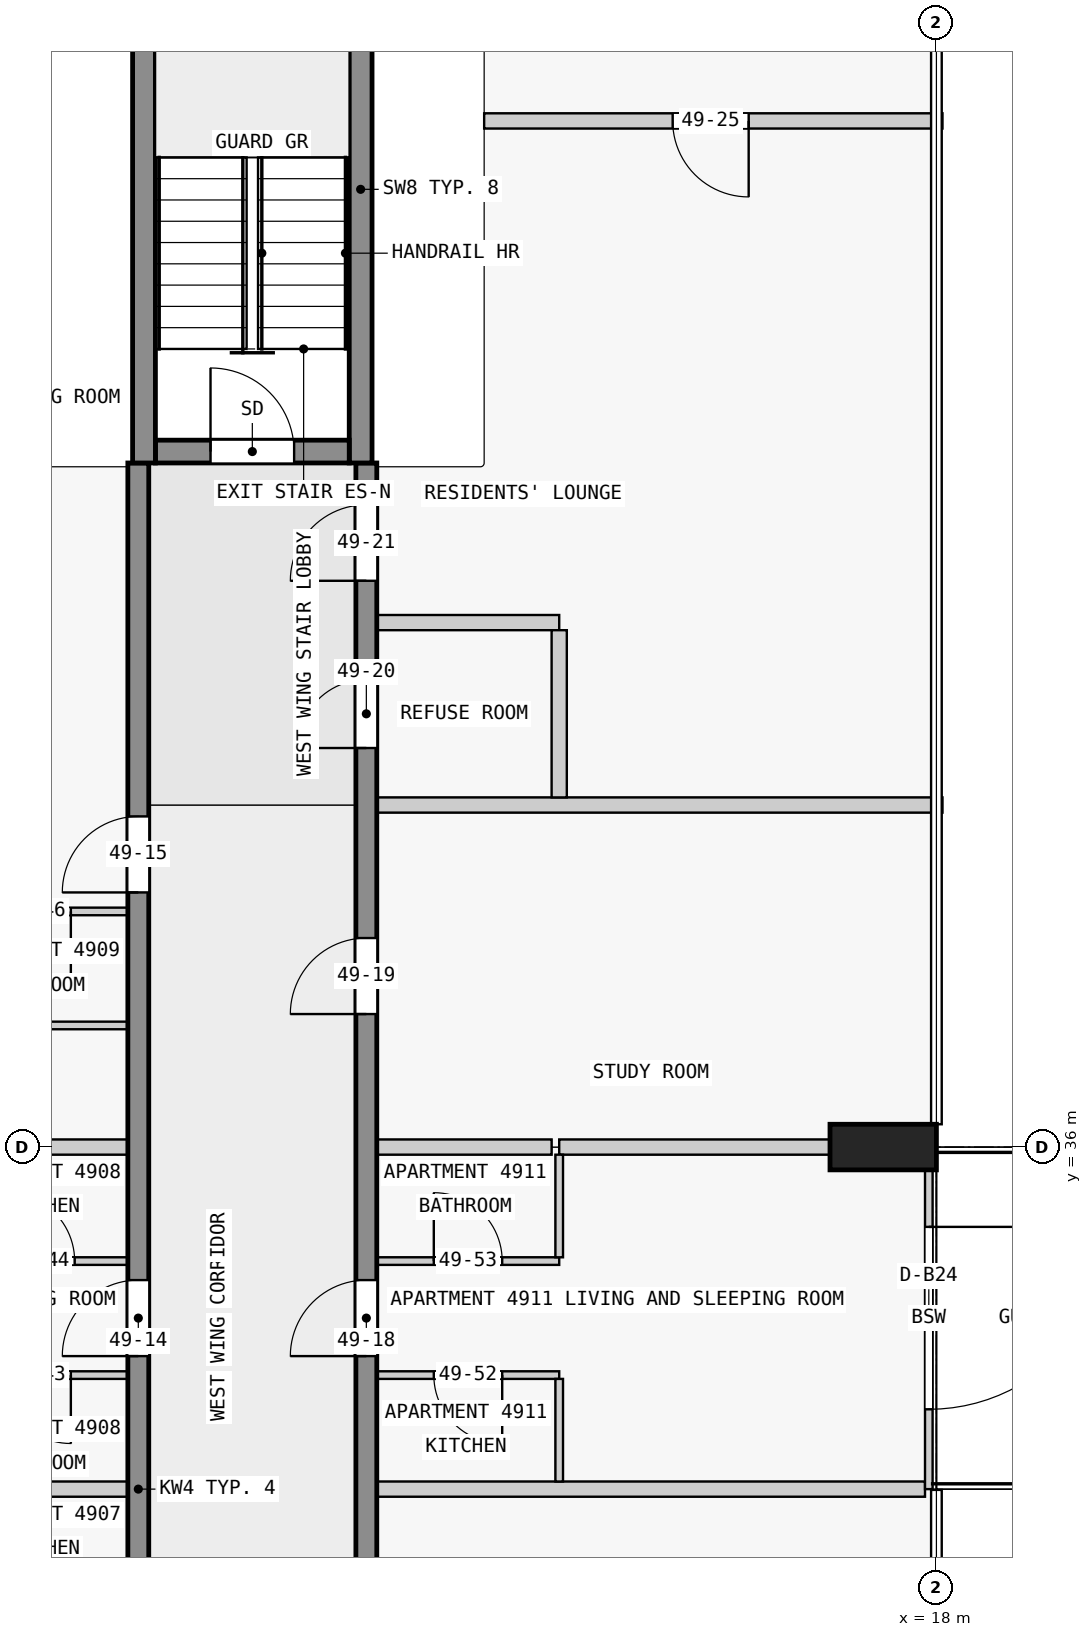
"""IFC4 building model, lengths in metres.
Left out: names, types, materials, properties, quantities, classifications, styles, units other than length and angle.
Written with IfcOpenShell. Run it as: python <this file> out.ifc"""

import sys

from ifc_helpers import new_model, si_unit, direction, frame, frame_2d, origin, origin_2d, place, context, subcontext, project, spatial, rectangle, extrude, element, fill, save


model = new_model("IFC4")
c1 = context("Model", 3, precision=1e-05, world=origin(), true_north=direction((0.0, 1.0)))
c2 = subcontext(c1, "Body", "Model", "MODEL_VIEW")
j1 = project(units=[si_unit("LENGTHUNIT", "METRE"), si_unit("PLANEANGLEUNIT", "RADIAN")], contexts=[c1])
p1 = place(None, origin())
s1 = spatial("IfcSite", under=j1, at=p1, CompositionType="ELEMENT")
p2 = place(p1, origin())
s2 = spatial("IfcBuilding", under=s1, at=p2, CompositionType="ELEMENT")
p3 = place(p2, frame((0.0, 0.0, 190.9)))
s3 = spatial("IfcBuildingStorey", under=s2, at=p3, CompositionType="ELEMENT", Elevation=190.9)
p4 = place(p3, frame((17.3, 36.0, 0.0), z_axis=(0.0, 0.0, 1.0), x_axis=(0.0, 1.0, 0.0)))
e1 = element("IfcColumn", 1, at=p4, inside=s3, PredefinedType="COLUMN", context=c2, shape_type="SweptSolid", body=[
    extrude(rectangle(XDim=0.6, YDim=1.4, at=origin_2d()), origin(), (0.0, 0.0, 1.0), 3.5),
])
p5 = place(p3, frame((7.725, 45.15, 0.0), z_axis=(0.0, 0.0, 1.0), x_axis=(1.0, 0.0, 0.0)))
e2 = element("IfcWall", 2, at=p5, inside=s3, PredefinedType="SHEAR", context=c2, shape_type="SweptSolid", body=[
    extrude(rectangle(XDim=2.55, YDim=0.3, at=frame_2d((1.275, 0.0))), origin(), (0.0, 0.0, 1.0), 3.5),
])
p6 = place(p5, frame((0.725, 0.0, 0.0)))
e3 = element("IfcOpeningElement", 3, at=p6, cuts=e2, PredefinedType="OPENING", context=c2, shape_type="SweptSolid", body=[
    extrude(rectangle(XDim=1.1, YDim=2.1, at=frame_2d((0.55, 1.05))), frame((0.0, 0.16, 0.0), z_axis=(0.0, -1.0, 0.0), x_axis=(1.0, 0.0, 0.0)), (0.0, 0.0, 1.0), 0.32),
])
for number, where, z_axis, x_axis in (
    (4, (7.575, 45.0, 0.0), (0.0, 0.0, 1.0), (0.0, 1.0, 0.0)),
    (5, (10.425, 45.0, 0.0), (0.0, 0.0, 1.0), (0.0, 1.0, 0.0)),
):
    element("IfcWall", number, at=place(p3, frame(where, z_axis=z_axis, x_axis=x_axis)), inside=s3, PredefinedType="SHEAR", context=c2, shape_type="SweptSolid", body=[
        extrude(rectangle(XDim=7.2, YDim=0.3, at=frame_2d((3.6, 0.0))), origin(), (0.0, 0.0, 1.0), 3.5),
    ])
p7 = place(p3, frame((7.5, 18.0, 0.0), z_axis=(0.0, 0.0, 1.0), x_axis=(0.0, 1.0, 0.0)))
e6 = element("IfcWall", 6, at=p7, inside=s3, PredefinedType="SHEAR", context=c2, shape_type="SweptSolid", body=[
    extrude(rectangle(XDim=27.0, YDim=0.275, at=frame_2d((13.5, 0.0))), origin(), (0.0, 0.0, 1.0), 3.25),
])
p8 = place(p7, frame((1.75, 0.0, 0.0)))
e7 = element("IfcOpeningElement", 7, at=p8, cuts=e6, PredefinedType="OPENING", context=c2, shape_type="SweptSolid", body=[
    extrude(rectangle(XDim=1.0, YDim=2.1, at=frame_2d((0.5, 1.05))), frame((0.0, 0.147, 0.0), z_axis=(0.0, -1.0, 0.0), x_axis=(1.0, 0.0, 0.0)), (0.0, 0.0, 1.0), 0.295),
])
p9 = place(p7, frame((5.85, 0.0, 0.0)))
e8 = element("IfcOpeningElement", 8, at=p9, cuts=e6, PredefinedType="OPENING", context=c2, shape_type="SweptSolid", body=[
    extrude(rectangle(XDim=1.8, YDim=2.1, at=frame_2d((0.9, 1.05))), frame((0.0, 0.147, 0.0), z_axis=(0.0, -1.0, 0.0), x_axis=(1.0, 0.0, 0.0)), (0.0, 0.0, 1.0), 0.295),
])
p10 = place(p7, frame((10.75, 0.0, 0.0)))
e9 = element("IfcOpeningElement", 9, at=p10, cuts=e6, PredefinedType="OPENING", context=c2, shape_type="SweptSolid", body=[
    extrude(rectangle(XDim=1.0, YDim=2.1, at=frame_2d((0.5, 1.05))), frame((0.0, 0.147, 0.0), z_axis=(0.0, -1.0, 0.0), x_axis=(1.0, 0.0, 0.0)), (0.0, 0.0, 1.0), 0.295),
])
p11 = place(p7, frame((15.25, 0.0, 0.0)))
e10 = element("IfcOpeningElement", 10, at=p11, cuts=e6, PredefinedType="OPENING", context=c2, shape_type="SweptSolid", body=[
    extrude(rectangle(XDim=1.0, YDim=2.1, at=frame_2d((0.5, 1.05))), frame((0.0, 0.147, 0.0), z_axis=(0.0, -1.0, 0.0), x_axis=(1.0, 0.0, 0.0)), (0.0, 0.0, 1.0), 0.295),
])
p12 = place(p7, frame((21.35, 0.0, 0.0)))
e11 = element("IfcOpeningElement", 11, at=p12, cuts=e6, PredefinedType="OPENING", context=c2, shape_type="SweptSolid", body=[
    extrude(rectangle(XDim=1.0, YDim=2.1, at=frame_2d((0.5, 1.05))), frame((0.0, 0.147, 0.0), z_axis=(0.0, -1.0, 0.0), x_axis=(1.0, 0.0, 0.0)), (0.0, 0.0, 1.0), 0.295),
])
p13 = place(p3, frame((10.5, 18.0, 0.0), z_axis=(0.0, 0.0, 1.0), x_axis=(0.0, 1.0, 0.0)))
e12 = element("IfcWall", 12, at=p13, inside=s3, PredefinedType="SHEAR", context=c2, shape_type="SweptSolid", body=[
    extrude(rectangle(XDim=27.0, YDim=0.275, at=frame_2d((13.5, 0.0))), origin(), (0.0, 0.0, 1.0), 3.25),
])
p14 = place(p13, frame((1.75, 0.0, 0.0)))
e13 = element("IfcOpeningElement", 13, at=p14, cuts=e12, PredefinedType="OPENING", context=c2, shape_type="SweptSolid", body=[
    extrude(rectangle(XDim=1.0, YDim=2.1, at=frame_2d((0.5, 1.05))), frame((0.0, 0.147, 0.0), z_axis=(0.0, -1.0, 0.0), x_axis=(1.0, 0.0, 0.0)), (0.0, 0.0, 1.0), 0.295),
])
p15 = place(p13, frame((6.25, 0.0, 0.0)))
e14 = element("IfcOpeningElement", 14, at=p15, cuts=e12, PredefinedType="OPENING", context=c2, shape_type="SweptSolid", body=[
    extrude(rectangle(XDim=1.0, YDim=2.1, at=frame_2d((0.5, 1.05))), frame((0.0, 0.147, 0.0), z_axis=(0.0, -1.0, 0.0), x_axis=(1.0, 0.0, 0.0)), (0.0, 0.0, 1.0), 0.295),
])
p16 = place(p13, frame((15.25, 0.0, 0.0)))
e15 = element("IfcOpeningElement", 15, at=p16, cuts=e12, PredefinedType="OPENING", context=c2, shape_type="SweptSolid", body=[
    extrude(rectangle(XDim=1.0, YDim=2.1, at=frame_2d((0.5, 1.05))), frame((0.0, 0.147, 0.0), z_axis=(0.0, -1.0, 0.0), x_axis=(1.0, 0.0, 0.0)), (0.0, 0.0, 1.0), 0.295),
])
p17 = place(p13, frame((19.75, 0.0, 0.0)))
e16 = element("IfcOpeningElement", 16, at=p17, cuts=e12, PredefinedType="OPENING", context=c2, shape_type="SweptSolid", body=[
    extrude(rectangle(XDim=1.0, YDim=2.1, at=frame_2d((0.5, 1.05))), frame((0.0, 0.147, 0.0), z_axis=(0.0, -1.0, 0.0), x_axis=(1.0, 0.0, 0.0)), (0.0, 0.0, 1.0), 0.295),
])
p18 = place(p13, frame((23.25, 0.0, 0.0)))
e17 = element("IfcOpeningElement", 17, at=p18, cuts=e12, PredefinedType="OPENING", context=c2, shape_type="SweptSolid", body=[
    extrude(rectangle(XDim=0.9, YDim=2.1, at=frame_2d((0.45, 1.05))), frame((0.0, 0.147, 0.0), z_axis=(0.0, -1.0, 0.0), x_axis=(1.0, 0.0, 0.0)), (0.0, 0.0, 1.0), 0.295),
])
p19 = place(p13, frame((25.45, 0.0, 0.0)))
e18 = element("IfcOpeningElement", 18, at=p19, cuts=e12, PredefinedType="OPENING", context=c2, shape_type="SweptSolid", body=[
    extrude(rectangle(XDim=1.0, YDim=2.1, at=frame_2d((0.5, 1.05))), frame((0.0, 0.147, 0.0), z_axis=(0.0, -1.0, 0.0), x_axis=(1.0, 0.0, 0.0)), (0.0, 0.0, 1.0), 0.295),
])
p20 = place(p3, frame((17.9, 36.0, 0.0), z_axis=(0.0, 0.0, 1.0), x_axis=(0.0, -1.0, 0.0)))
e19 = element("IfcWall", 19, at=p20, inside=s3, PredefinedType="STANDARD", context=c2, shape_type="SweptSolid", body=[
    extrude(rectangle(XDim=4.5, YDim=0.1, at=frame_2d((2.25, 0.0))), origin(), (0.0, 0.0, 1.0), 3.25),
])
p21 = place(p20, frame((1.05, 0.0, 0.0)))
e20 = element("IfcOpeningElement", 20, at=p21, cuts=e19, PredefinedType="OPENING", context=c2, shape_type="SweptSolid", body=[
    extrude(rectangle(XDim=2.4, YDim=2.4, at=frame_2d((1.2, 1.2))), frame((0.0, 0.06, 0.0), z_axis=(0.0, -1.0, 0.0), x_axis=(1.0, 0.0, 0.0)), (0.0, 0.0, 1.0), 0.12),
])
p22 = place(p3, frame((7.363, 31.5, 0.0), z_axis=(0.0, 0.0, 1.0), x_axis=(-1.0, 0.0, 0.0)))
e21 = element("IfcWall", 21, at=p22, inside=s3, PredefinedType="PARTITIONING", context=c2, shape_type="SweptSolid", body=[
    extrude(rectangle(XDim=2.3, YDim=0.2, at=frame_2d((1.15, 0.0))), origin(), (0.0, 0.0, 1.0), 3.25),
])
p23 = place(p3, frame((17.85, 31.5, 0.0), z_axis=(0.0, 0.0, 1.0), x_axis=(-1.0, 0.0, 0.0)))
e22 = element("IfcWall", 22, at=p23, inside=s3, PredefinedType="PARTITIONING", context=c2, shape_type="SweptSolid", body=[
    extrude(rectangle(XDim=7.213, YDim=0.2, at=frame_2d((3.606, 0.0))), origin(), (0.0, 0.0, 1.0), 3.25),
])
p24 = place(p3, frame((7.363, 33.0, 0.0), z_axis=(0.0, 0.0, 1.0), x_axis=(-1.0, 0.0, 0.0)))
e23 = element("IfcWall", 23, at=p24, inside=s3, PredefinedType="PARTITIONING", context=c2, shape_type="SweptSolid", body=[
    extrude(rectangle(XDim=2.35, YDim=0.1, at=frame_2d((1.175, 0.0))), origin(), (0.0, 0.0, 1.0), 3.25),
])
p25 = place(p24, frame((0.75, 0.0, 0.0)))
e24 = element("IfcOpeningElement", 24, at=p25, cuts=e23, PredefinedType="OPENING", context=c2, shape_type="SweptSolid", body=[
    extrude(rectangle(XDim=0.9, YDim=2.1, at=frame_2d((0.45, 1.05))), frame((0.0, 0.06, 0.0), z_axis=(0.0, -1.0, 0.0), x_axis=(1.0, 0.0, 0.0)), (0.0, 0.0, 1.0), 0.12),
])
p26 = place(p3, frame((13.038, 33.0, 0.0), z_axis=(0.0, 0.0, 1.0), x_axis=(-1.0, 0.0, 0.0)))
e25 = element("IfcWall", 25, at=p26, inside=s3, PredefinedType="PARTITIONING", context=c2, shape_type="SweptSolid", body=[
    extrude(rectangle(XDim=2.4, YDim=0.1, at=frame_2d((1.2, 0.0))), origin(), (0.0, 0.0, 1.0), 3.25),
])
p27 = place(p26, frame((0.75, 0.0, 0.0)))
e26 = element("IfcOpeningElement", 26, at=p27, cuts=e25, PredefinedType="OPENING", context=c2, shape_type="SweptSolid", body=[
    extrude(rectangle(XDim=0.9, YDim=2.1, at=frame_2d((0.45, 1.05))), frame((0.0, 0.06, 0.0), z_axis=(0.0, -1.0, 0.0), x_axis=(1.0, 0.0, 0.0)), (0.0, 0.0, 1.0), 0.12),
])
p28 = place(p3, frame((5.012, 34.5, 0.0), z_axis=(0.0, 0.0, 1.0), x_axis=(1.0, 0.0, 0.0)))
e27 = element("IfcWall", 27, at=p28, inside=s3, PredefinedType="PARTITIONING", context=c2, shape_type="SweptSolid", body=[
    extrude(rectangle(XDim=2.35, YDim=0.1, at=frame_2d((1.175, 0.0))), origin(), (0.0, 0.0, 1.0), 3.25),
])
p29 = place(p28, frame((0.75, 0.0, 0.0)))
e28 = element("IfcOpeningElement", 28, at=p29, cuts=e27, PredefinedType="OPENING", context=c2, shape_type="SweptSolid", body=[
    extrude(rectangle(XDim=0.9, YDim=2.1, at=frame_2d((0.45, 1.05))), frame((0.0, 0.06, 0.0), z_axis=(0.0, -1.0, 0.0), x_axis=(1.0, 0.0, 0.0)), (0.0, 0.0, 1.0), 0.12),
])
p30 = place(p3, frame((10.637, 34.5, 0.0), z_axis=(0.0, 0.0, 1.0), x_axis=(1.0, 0.0, 0.0)))
e29 = element("IfcWall", 29, at=p30, inside=s3, PredefinedType="PARTITIONING", context=c2, shape_type="SweptSolid", body=[
    extrude(rectangle(XDim=2.4, YDim=0.1, at=frame_2d((1.2, 0.0))), origin(), (0.0, 0.0, 1.0), 3.25),
])
p31 = place(p30, frame((0.75, 0.0, 0.0)))
e30 = element("IfcOpeningElement", 30, at=p31, cuts=e29, PredefinedType="OPENING", context=c2, shape_type="SweptSolid", body=[
    extrude(rectangle(XDim=0.9, YDim=2.1, at=frame_2d((0.45, 1.05))), frame((0.0, 0.06, 0.0), z_axis=(0.0, -1.0, 0.0), x_axis=(1.0, 0.0, 0.0)), (0.0, 0.0, 1.0), 0.12),
])
for number, where, z_axis, x_axis in (
    (31, (7.363, 36.0, 0.0), (0.0, 0.0, 1.0), (-1.0, 0.0, 0.0)),
    (32, (12.938, 36.0, 0.0), (0.0, 0.0, 1.0), (-1.0, 0.0, 0.0)),
):
    element("IfcWall", number, at=place(p3, frame(where, z_axis=z_axis, x_axis=x_axis)), inside=s3, PredefinedType="PARTITIONING", context=c2, shape_type="SweptSolid", body=[
        extrude(rectangle(XDim=2.3, YDim=0.2, at=frame_2d((1.15, 0.0))), origin(), (0.0, 0.0, 1.0), 3.25),
    ])
p32 = place(p3, frame((13.038, 36.0, 0.0), z_axis=(0.0, 0.0, 1.0), x_axis=(1.0, 0.0, 0.0)))
e33 = element("IfcWall", 33, at=p32, inside=s3, PredefinedType="PARTITIONING", context=c2, shape_type="SweptSolid", body=[
    extrude(rectangle(XDim=3.562, YDim=0.2, at=frame_2d((1.781, 0.0))), origin(), (0.0, 0.0, 1.0), 3.25),
])
p33 = place(p3, frame((7.363, 37.6, 0.0), z_axis=(0.0, 0.0, 1.0), x_axis=(-1.0, 0.0, 0.0)))
e34 = element("IfcWall", 34, at=p33, inside=s3, PredefinedType="PARTITIONING", context=c2, shape_type="SweptSolid", body=[
    extrude(rectangle(XDim=2.35, YDim=0.1, at=frame_2d((1.175, 0.0))), origin(), (0.0, 0.0, 1.0), 3.25),
])
p34 = place(p3, frame((7.363, 39.1, 0.0), z_axis=(0.0, 0.0, 1.0), x_axis=(-1.0, 0.0, 0.0)))
e35 = element("IfcWall", 35, at=p34, inside=s3, PredefinedType="PARTITIONING", context=c2, shape_type="SweptSolid", body=[
    extrude(rectangle(XDim=2.35, YDim=0.1, at=frame_2d((1.175, 0.0))), origin(), (0.0, 0.0, 1.0), 3.25),
])
p35 = place(p34, frame((0.75, 0.0, 0.0)))
e36 = element("IfcOpeningElement", 36, at=p35, cuts=e35, PredefinedType="OPENING", context=c2, shape_type="SweptSolid", body=[
    extrude(rectangle(XDim=0.9, YDim=2.1, at=frame_2d((0.45, 1.05))), frame((0.0, 0.06, 0.0), z_axis=(0.0, -1.0, 0.0), x_axis=(1.0, 0.0, 0.0)), (0.0, 0.0, 1.0), 0.12),
])
p36 = place(p3, frame((18.08, 40.5, 0.0), z_axis=(0.0, 0.0, 1.0), x_axis=(-1.0, 0.0, 0.0)))
e37 = element("IfcWall", 37, at=p36, inside=s3, PredefinedType="PARTITIONING", context=c2, shape_type="SweptSolid", body=[
    extrude(rectangle(XDim=7.443, YDim=0.2, at=frame_2d((3.721, 0.0))), origin(), (0.0, 0.0, 1.0), 3.25),
])
p37 = place(p3, frame((13.038, 42.9, 0.0), z_axis=(0.0, 0.0, 1.0), x_axis=(-1.0, 0.0, 0.0)))
e38 = element("IfcWall", 38, at=p37, inside=s3, PredefinedType="PARTITIONING", context=c2, shape_type="SweptSolid", body=[
    extrude(rectangle(XDim=2.4, YDim=0.2, at=frame_2d((1.2, 0.0))), origin(), (0.0, 0.0, 1.0), 3.25),
])
p38 = place(p3, frame((18.08, 49.5, 0.0), z_axis=(0.0, 0.0, 1.0), x_axis=(-1.0, 0.0, 0.0)))
e39 = element("IfcWall", 39, at=p38, inside=s3, PredefinedType="PARTITIONING", context=c2, shape_type="SweptSolid", body=[
    extrude(rectangle(XDim=6.03, YDim=0.2, at=frame_2d((3.015, 0.0))), origin(), (0.0, 0.0, 1.0), 3.25),
])
p39 = place(p38, frame((2.55, 0.0, 0.0)))
e40 = element("IfcOpeningElement", 40, at=p39, cuts=e39, PredefinedType="OPENING", context=c2, shape_type="SweptSolid", body=[
    extrude(rectangle(XDim=1.0, YDim=2.1, at=frame_2d((0.5, 1.05))), frame((0.0, 0.11, 0.0), z_axis=(0.0, -1.0, 0.0), x_axis=(1.0, 0.0, 0.0)), (0.0, 0.0, 1.0), 0.22),
])
for number, where, z_axis, x_axis in (
    (41, (13.038, 31.6, 0.0), (0.0, 0.0, 1.0), (0.0, 1.0, 0.0)),
    (42, (13.038, 34.55, 0.0), (0.0, 0.0, 1.0), (0.0, 1.0, 0.0)),
):
    element("IfcWall", number, at=place(p3, frame(where, z_axis=z_axis, x_axis=x_axis)), inside=s3, PredefinedType="PARTITIONING", context=c2, shape_type="SweptSolid", body=[
        extrude(rectangle(XDim=1.35, YDim=0.1, at=frame_2d((0.675, 0.0))), origin(), (0.0, 0.0, 1.0), 3.25),
    ])
p40 = place(p3, frame((13.038, 40.6, 0.0), z_axis=(0.0, 0.0, 1.0), x_axis=(0.0, 1.0, 0.0)))
e43 = element("IfcWall", 43, at=p40, inside=s3, PredefinedType="PARTITIONING", context=c2, shape_type="SweptSolid", body=[
    extrude(rectangle(XDim=2.2, YDim=0.2, at=frame_2d((1.1, 0.0))), origin(), (0.0, 0.0, 1.0), 3.25),
])
p41 = place(p21, origin())
e44 = element("IfcDoor", 44, at=p41, inside=s3, OperationType="SINGLE_SWING_LEFT", PredefinedType="DOOR", context=c2, shape_type="SweptSolid", body=[
    extrude(rectangle(XDim=2.4, YDim=2.4, at=frame_2d((1.2, 1.2))), frame((0.0, 0.025, 0.0), z_axis=(0.0, -1.0, 0.0), x_axis=(1.0, 0.0, 0.0)), (0.0, 0.0, 1.0), 0.05),
])
fill(e20, e44)
p42 = place(p6, origin())
e45 = element("IfcDoor", 45, at=p42, inside=s3, OperationType="SINGLE_SWING_LEFT", PredefinedType="DOOR", context=c2, shape_type="SweptSolid", body=[
    extrude(rectangle(XDim=1.1, YDim=2.1, at=frame_2d((0.55, 1.05))), frame((0.0, 0.025, 0.0), z_axis=(0.0, -1.0, 0.0), x_axis=(1.0, 0.0, 0.0)), (0.0, 0.0, 1.0), 0.05),
])
fill(e3, e45)
p43 = place(p11, origin())
e46 = element("IfcDoor", 46, at=p43, inside=s3, OperationType="SINGLE_SWING_RIGHT", PredefinedType="DOOR", context=c2, shape_type="SweptSolid", body=[
    extrude(rectangle(XDim=1.0, YDim=2.1, at=frame_2d((0.5, 1.05))), frame((0.0, 0.025, 0.0), z_axis=(0.0, -1.0, 0.0), x_axis=(1.0, 0.0, 0.0)), (0.0, 0.0, 1.0), 0.05),
])
fill(e10, e46)
p44 = place(p12, origin())
e47 = element("IfcDoor", 47, at=p44, inside=s3, OperationType="SINGLE_SWING_RIGHT", PredefinedType="DOOR", context=c2, shape_type="SweptSolid", body=[
    extrude(rectangle(XDim=1.0, YDim=2.1, at=frame_2d((0.5, 1.05))), frame((0.0, 0.025, 0.0), z_axis=(0.0, -1.0, 0.0), x_axis=(1.0, 0.0, 0.0)), (0.0, 0.0, 1.0), 0.05),
])
fill(e11, e47)
p45 = place(p16, origin())
e48 = element("IfcDoor", 48, at=p45, inside=s3, OperationType="SINGLE_SWING_RIGHT", PredefinedType="DOOR", context=c2, shape_type="SweptSolid", body=[
    extrude(rectangle(XDim=1.0, YDim=2.1, at=frame_2d((0.5, 1.05))), frame((0.0, 0.025, 0.0), z_axis=(0.0, -1.0, 0.0), x_axis=(1.0, 0.0, 0.0)), (0.0, 0.0, 1.0), 0.05),
])
fill(e15, e48)
p46 = place(p17, origin())
e49 = element("IfcDoor", 49, at=p46, inside=s3, OperationType="SINGLE_SWING_RIGHT", PredefinedType="DOOR", context=c2, shape_type="SweptSolid", body=[
    extrude(rectangle(XDim=1.0, YDim=2.1, at=frame_2d((0.5, 1.05))), frame((0.0, 0.025, 0.0), z_axis=(0.0, -1.0, 0.0), x_axis=(1.0, 0.0, 0.0)), (0.0, 0.0, 1.0), 0.05),
])
fill(e16, e49)
p47 = place(p18, origin())
e50 = element("IfcDoor", 50, at=p47, inside=s3, OperationType="SINGLE_SWING_RIGHT", PredefinedType="DOOR", context=c2, shape_type="SweptSolid", body=[
    extrude(rectangle(XDim=0.9, YDim=2.1, at=frame_2d((0.45, 1.05))), frame((0.0, 0.025, 0.0), z_axis=(0.0, -1.0, 0.0), x_axis=(1.0, 0.0, 0.0)), (0.0, 0.0, 1.0), 0.05),
])
fill(e17, e50)
p48 = place(p19, origin())
e51 = element("IfcDoor", 51, at=p48, inside=s3, OperationType="SINGLE_SWING_RIGHT", PredefinedType="DOOR", context=c2, shape_type="SweptSolid", body=[
    extrude(rectangle(XDim=1.0, YDim=2.1, at=frame_2d((0.5, 1.05))), frame((0.0, 0.025, 0.0), z_axis=(0.0, -1.0, 0.0), x_axis=(1.0, 0.0, 0.0)), (0.0, 0.0, 1.0), 0.05),
])
fill(e18, e51)
p49 = place(p39, origin())
e52 = element("IfcDoor", 52, at=p49, inside=s3, OperationType="SINGLE_SWING_RIGHT", PredefinedType="DOOR", context=c2, shape_type="SweptSolid", body=[
    extrude(rectangle(XDim=1.0, YDim=2.1, at=frame_2d((0.5, 1.05))), frame((0.0, 0.025, 0.0), z_axis=(0.0, -1.0, 0.0), x_axis=(1.0, 0.0, 0.0)), (0.0, 0.0, 1.0), 0.05),
])
fill(e40, e52)
p50 = place(p25, origin())
e53 = element("IfcDoor", 53, at=p50, inside=s3, OperationType="SINGLE_SWING_RIGHT", PredefinedType="DOOR", context=c2, shape_type="SweptSolid", body=[
    extrude(rectangle(XDim=0.9, YDim=2.1, at=frame_2d((0.45, 1.05))), frame((0.0, 0.025, 0.0), z_axis=(0.0, -1.0, 0.0), x_axis=(1.0, 0.0, 0.0)), (0.0, 0.0, 1.0), 0.05),
])
fill(e24, e53)
p51 = place(p29, origin())
e54 = element("IfcDoor", 54, at=p51, inside=s3, OperationType="SINGLE_SWING_RIGHT", PredefinedType="DOOR", context=c2, shape_type="SweptSolid", body=[
    extrude(rectangle(XDim=0.9, YDim=2.1, at=frame_2d((0.45, 1.05))), frame((0.0, 0.025, 0.0), z_axis=(0.0, -1.0, 0.0), x_axis=(1.0, 0.0, 0.0)), (0.0, 0.0, 1.0), 0.05),
])
fill(e28, e54)
p52 = place(p35, origin())
e55 = element("IfcDoor", 55, at=p52, inside=s3, OperationType="SINGLE_SWING_RIGHT", PredefinedType="DOOR", context=c2, shape_type="SweptSolid", body=[
    extrude(rectangle(XDim=0.9, YDim=2.1, at=frame_2d((0.45, 1.05))), frame((0.0, 0.025, 0.0), z_axis=(0.0, -1.0, 0.0), x_axis=(1.0, 0.0, 0.0)), (0.0, 0.0, 1.0), 0.05),
])
fill(e36, e55)
p53 = place(p27, origin())
e56 = element("IfcDoor", 56, at=p53, inside=s3, OperationType="SINGLE_SWING_LEFT", PredefinedType="DOOR", context=c2, shape_type="SweptSolid", body=[
    extrude(rectangle(XDim=0.9, YDim=2.1, at=frame_2d((0.45, 1.05))), frame((0.0, 0.025, 0.0), z_axis=(0.0, -1.0, 0.0), x_axis=(1.0, 0.0, 0.0)), (0.0, 0.0, 1.0), 0.05),
])
fill(e26, e56)
p54 = place(p31, origin())
e57 = element("IfcDoor", 57, at=p54, inside=s3, OperationType="SINGLE_SWING_LEFT", PredefinedType="DOOR", context=c2, shape_type="SweptSolid", body=[
    extrude(rectangle(XDim=0.9, YDim=2.1, at=frame_2d((0.45, 1.05))), frame((0.0, 0.025, 0.0), z_axis=(0.0, -1.0, 0.0), x_axis=(1.0, 0.0, 0.0)), (0.0, 0.0, 1.0), 0.05),
])
fill(e30, e57)
save(model, sys.argv[1])
